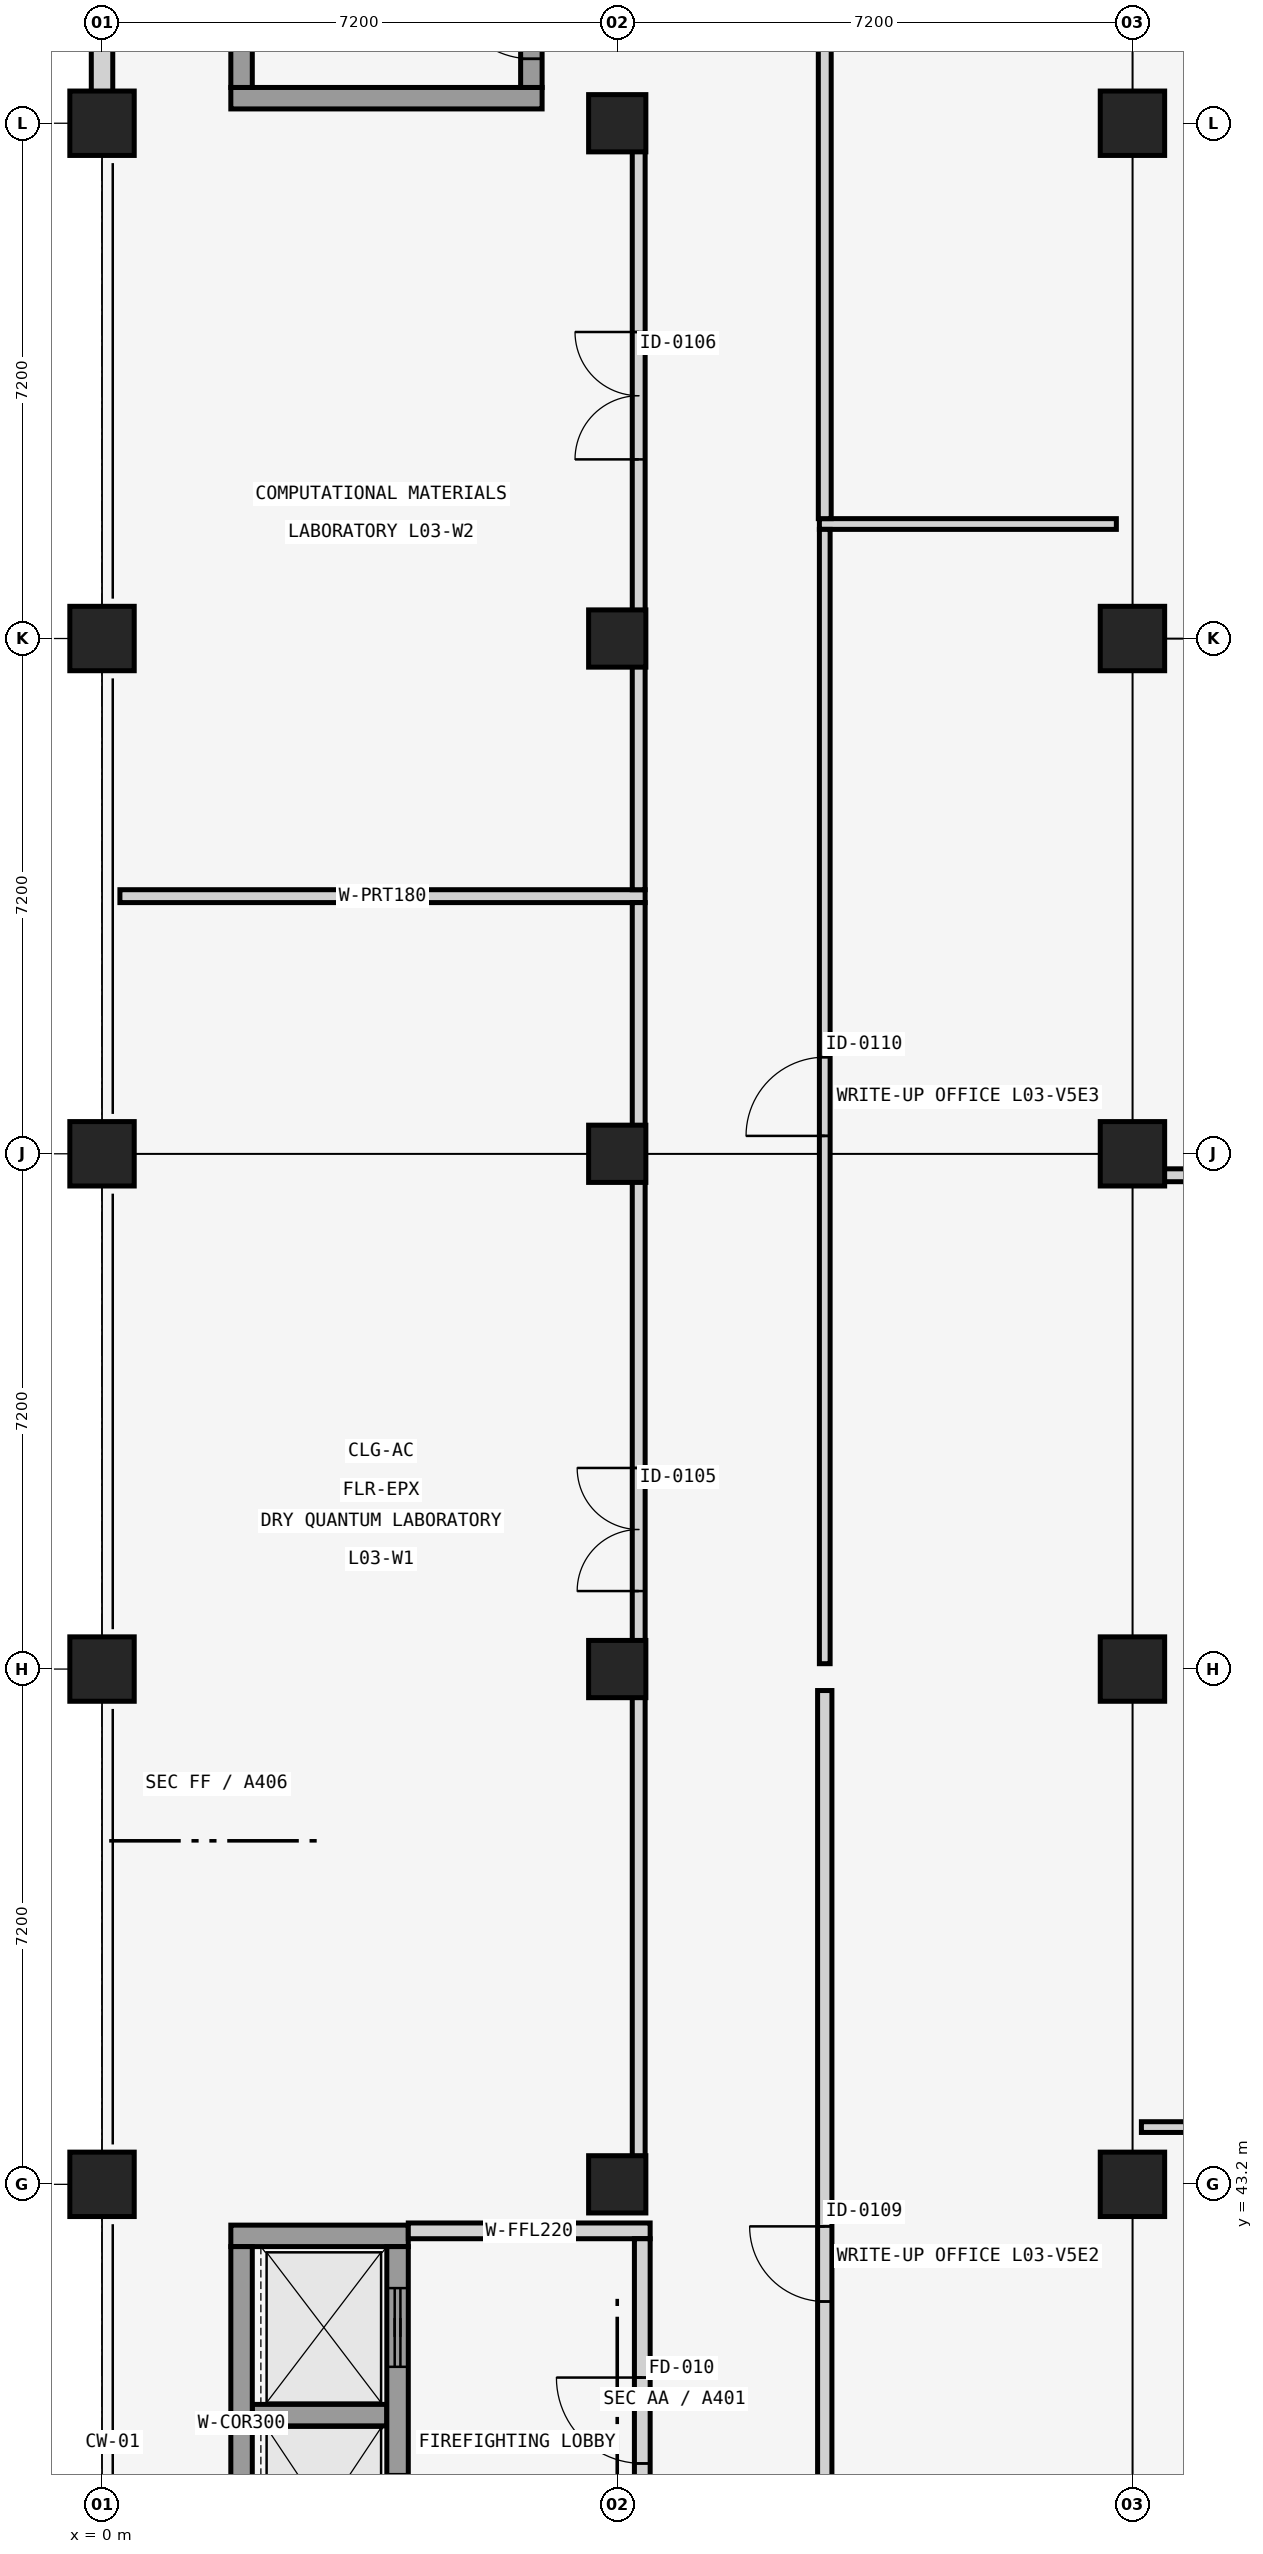
"""IFC4 building model, lengths in metres.
Left out: names, types, materials, properties, quantities, classifications, styles, units other than length and angle.
Written with IfcOpenShell. Run it as: python <this file> out.ifc"""

import sys

from ifc_helpers import new_model, si_unit, direction, frame, frame_2d, origin, origin_2d, place, context, subcontext, project, spatial, rectangle, extrude, element, fill, save


model = new_model("IFC4")
c1 = context("Model", 3, precision=1e-05, world=origin(), true_north=direction((0.0, 1.0)))
c2 = subcontext(c1, "Body", "Model", "MODEL_VIEW")
j1 = project(units=[si_unit("LENGTHUNIT", "METRE"), si_unit("PLANEANGLEUNIT", "RADIAN")], contexts=[c1])
p1 = place(None, origin())
s1 = spatial("IfcSite", under=j1, at=p1, CompositionType="ELEMENT")
p2 = place(p1, origin())
s2 = spatial("IfcBuilding", under=s1, at=p2, CompositionType="ELEMENT")
p3 = place(p2, frame((0.0, 0.0, 13.12)))
s3 = spatial("IfcBuildingStorey", under=s2, at=p3, CompositionType="ELEMENT", Elevation=13.12)
for number, where, z_axis, x_axis in (
    (1, (0.0, 43.2, 0.0), (0.0, 0.0, 1.0), (1.0, 0.0, 0.0)),
    (2, (0.0, 50.4, 0.0), (0.0, 0.0, 1.0), (1.0, 0.0, 0.0)),
    (3, (0.0, 57.6, 0.0), (0.0, 0.0, 1.0), (1.0, 0.0, 0.0)),
    (4, (0.0, 64.8, 0.0), (0.0, 0.0, 1.0), (1.0, 0.0, 0.0)),
    (5, (0.0, 72.0, 0.0), (0.0, 0.0, 1.0), (1.0, 0.0, 0.0)),
):
    element("IfcColumn", number, at=place(p3, frame(where, z_axis=z_axis, x_axis=x_axis)), inside=s3, PredefinedType="COLUMN", context=c2, shape_type="SweptSolid", body=[
        extrude(rectangle(XDim=0.9, YDim=0.9, at=origin_2d()), origin(), (0.0, 0.0, 1.0), 4.16),
    ])
for number, where, z_axis, x_axis in (
    (6, (7.2, 43.2, 0.0), (0.0, 0.0, 1.0), (1.0, 0.0, 0.0)),
    (7, (7.2, 50.4, 0.0), (0.0, 0.0, 1.0), (1.0, 0.0, 0.0)),
    (8, (7.2, 57.6, 0.0), (0.0, 0.0, 1.0), (1.0, 0.0, 0.0)),
    (9, (7.2, 64.8, 0.0), (0.0, 0.0, 1.0), (1.0, 0.0, 0.0)),
    (10, (7.2, 72.0, 0.0), (0.0, 0.0, 1.0), (1.0, 0.0, 0.0)),
):
    element("IfcColumn", number, at=place(p3, frame(where, z_axis=z_axis, x_axis=x_axis)), inside=s3, PredefinedType="COLUMN", context=c2, shape_type="SweptSolid", body=[
        extrude(rectangle(XDim=0.8, YDim=0.8, at=origin_2d()), origin(), (0.0, 0.0, 1.0), 4.16),
    ])
for number, where, z_axis, x_axis in (
    (11, (14.4, 43.2, 0.0), (0.0, 0.0, 1.0), (1.0, 0.0, 0.0)),
    (12, (14.4, 50.4, 0.0), (0.0, 0.0, 1.0), (1.0, 0.0, 0.0)),
    (13, (14.4, 57.6, 0.0), (0.0, 0.0, 1.0), (1.0, 0.0, 0.0)),
    (14, (14.4, 64.8, 0.0), (0.0, 0.0, 1.0), (1.0, 0.0, 0.0)),
    (15, (14.4, 72.0, 0.0), (0.0, 0.0, 1.0), (1.0, 0.0, 0.0)),
):
    element("IfcColumn", number, at=place(p3, frame(where, z_axis=z_axis, x_axis=x_axis)), inside=s3, PredefinedType="COLUMN", context=c2, shape_type="SweptSolid", body=[
        extrude(rectangle(XDim=0.9, YDim=0.9, at=origin_2d()), origin(), (0.0, 0.0, 1.0), 4.16),
    ])
p4 = place(p3, frame((0.0, 72.44, 0.0), z_axis=(0.0, 0.0, 1.0), x_axis=(0.0, 1.0, 0.0)))
e16 = element("IfcWall", 16, at=p4, inside=s3, PredefinedType="SOLIDWALL", context=c2, shape_type="SweptSolid", body=[
    extrude(rectangle(XDim=6.32, YDim=0.3, at=frame_2d((3.16, 0.0))), origin(), (0.0, 0.0, 1.0), 3.21),
])
p5 = place(p4, frame((2.935, 0.0, 0.65)))
e17 = element("IfcOpeningElement", 17, at=p5, cuts=e16, PredefinedType="OPENING", context=c2, shape_type="SweptSolid", body=[
    extrude(rectangle(XDim=0.45, YDim=2.4, at=frame_2d((0.225, 1.2))), frame((0.0, 0.16, 0.0), z_axis=(0.0, -1.0, 0.0), x_axis=(1.0, 0.0, 0.0)), (0.0, 0.0, 1.0), 0.32),
])
p6 = place(p3, frame((1.8, 42.48, 0.0), z_axis=(0.0, 0.0, 1.0), x_axis=(1.0, 0.0, 0.0)))
e18 = element("IfcWall", 18, at=p6, inside=s3, PredefinedType="SHEAR", context=c2, shape_type="SweptSolid", body=[
    extrude(rectangle(XDim=2.48, YDim=0.3, at=frame_2d((1.24, 0.0))), origin(), (0.0, 0.0, 1.0), 3.81),
])
p7 = place(p3, frame((2.1, 39.975, 0.0), z_axis=(0.0, 0.0, 1.0), x_axis=(1.0, 0.0, 0.0)))
e19 = element("IfcWall", 19, at=p7, inside=s3, PredefinedType="SHEAR", context=c2, shape_type="SweptSolid", body=[
    extrude(rectangle(XDim=1.88, YDim=0.3, at=frame_2d((0.94, 0.0))), origin(), (0.0, 0.0, 1.0), 3.81),
])
p8 = place(p3, frame((1.95, 37.4, 0.0), z_axis=(0.0, 0.0, 1.0), x_axis=(0.0, 1.0, 0.0)))
e20 = element("IfcWall", 20, at=p8, inside=s3, PredefinedType="SHEAR", context=c2, shape_type="SweptSolid", body=[
    extrude(rectangle(XDim=4.93, YDim=0.3, at=frame_2d((2.465, 0.0))), origin(), (0.0, 0.0, 1.0), 3.81),
])
p9 = place(p3, frame((4.13, 37.4, 0.0), z_axis=(0.0, 0.0, 1.0), x_axis=(0.0, 1.0, 0.0)))
e21 = element("IfcWall", 21, at=p9, inside=s3, PredefinedType="SHEAR", context=c2, shape_type="SweptSolid", body=[
    extrude(rectangle(XDim=4.93, YDim=0.3, at=frame_2d((2.465, 0.0))), origin(), (0.0, 0.0, 1.0), 3.81),
])
p10 = place(p9, frame((0.65, 0.0, 0.0)))
e22 = element("IfcOpeningElement", 22, at=p10, cuts=e21, PredefinedType="OPENING", context=c2, shape_type="SweptSolid", body=[
    extrude(rectangle(XDim=1.1, YDim=2.2, at=frame_2d((0.55, 1.1))), frame((0.0, 0.16, 0.0), z_axis=(0.0, -1.0, 0.0), x_axis=(1.0, 0.0, 0.0)), (0.0, 0.0, 1.0), 0.32),
])
p11 = place(p9, frame((3.25, 0.0, 0.0)))
e23 = element("IfcOpeningElement", 23, at=p11, cuts=e21, PredefinedType="OPENING", context=c2, shape_type="SweptSolid", body=[
    extrude(rectangle(XDim=1.1, YDim=2.2, at=frame_2d((0.55, 1.1))), frame((0.0, 0.16, 0.0), z_axis=(0.0, -1.0, 0.0), x_axis=(1.0, 0.0, 0.0)), (0.0, 0.0, 1.0), 0.32),
])
p12 = place(p3, frame((4.28, 42.55, 0.0), z_axis=(0.0, 0.0, 1.0), x_axis=(1.0, 0.0, 0.0)))
e24 = element("IfcWall", 24, at=p12, inside=s3, PredefinedType="SOLIDWALL", context=c2, shape_type="SweptSolid", body=[
    extrude(rectangle(XDim=3.38, YDim=0.22, at=frame_2d((1.69, 0.0))), origin(), (0.0, 0.0, 1.0), 2.81),
])
p13 = place(p3, frame((7.55, 37.36, 0.0), z_axis=(0.0, 0.0, 1.0), x_axis=(0.0, 1.0, 0.0)))
e25 = element("IfcWall", 25, at=p13, inside=s3, PredefinedType="SOLIDWALL", context=c2, shape_type="SweptSolid", body=[
    extrude(rectangle(XDim=5.08, YDim=0.22, at=frame_2d((2.54, 0.0))), origin(), (0.0, 0.0, 1.0), 3.51),
])
p14 = place(p13, frame((1.94, 0.0, 0.0)))
e26 = element("IfcOpeningElement", 26, at=p14, cuts=e25, PredefinedType="OPENING", context=c2, shape_type="SweptSolid", body=[
    extrude(rectangle(XDim=1.2, YDim=2.2, at=frame_2d((0.6, 1.1))), frame((0.0, 0.12, 0.0), z_axis=(0.0, -1.0, 0.0), x_axis=(1.0, 0.0, 0.0)), (0.0, 0.0, 1.0), 0.24),
])
p15 = place(p3, frame((1.8, 72.35, 0.0), z_axis=(0.0, 0.0, 1.0), x_axis=(1.0, 0.0, 0.0)))
e27 = element("IfcWall", 27, at=p15, inside=s3, PredefinedType="SHEAR", context=c2, shape_type="SweptSolid", body=[
    extrude(rectangle(XDim=4.35, YDim=0.3, at=frame_2d((2.175, 0.0))), origin(), (0.0, 0.0, 1.0), 3.81),
])
p16 = place(p3, frame((1.95, 72.5, 0.0), z_axis=(0.0, 0.0, 1.0), x_axis=(0.0, 1.0, 0.0)))
e28 = element("IfcWall", 28, at=p16, inside=s3, PredefinedType="SHEAR", context=c2, shape_type="SweptSolid", body=[
    extrude(rectangle(XDim=7.8, YDim=0.3, at=frame_2d((3.9, 0.0))), origin(), (0.0, 0.0, 1.0), 3.81),
])
p17 = place(p3, frame((6.0, 72.5, 0.0), z_axis=(0.0, 0.0, 1.0), x_axis=(0.0, 1.0, 0.0)))
e29 = element("IfcWall", 29, at=p17, inside=s3, PredefinedType="SHEAR", context=c2, shape_type="SweptSolid", body=[
    extrude(rectangle(XDim=7.8, YDim=0.3, at=frame_2d((3.9, 0.0))), origin(), (0.0, 0.0, 1.0), 3.81),
])
p18 = place(p17, frame((0.4, 0.0, 0.0)))
e30 = element("IfcOpeningElement", 30, at=p18, cuts=e29, PredefinedType="OPENING", context=c2, shape_type="SweptSolid", body=[
    extrude(rectangle(XDim=1.15, YDim=2.2, at=frame_2d((0.575, 1.1))), frame((0.0, 0.16, 0.0), z_axis=(0.0, -1.0, 0.0), x_axis=(1.0, 0.0, 0.0)), (0.0, 0.0, 1.0), 0.32),
])
p19 = place(p3, frame((0.25, 61.2, 0.0), z_axis=(0.0, 0.0, 1.0), x_axis=(1.0, 0.0, 0.0)))
e31 = element("IfcWall", 31, at=p19, inside=s3, PredefinedType="PARTITIONING", context=c2, shape_type="SweptSolid", body=[
    extrude(rectangle(XDim=7.34, YDim=0.18, at=frame_2d((3.67, 0.0))), origin(), (0.0, 0.0, 1.0), 3.21),
])
p20 = place(p3, frame((7.5, 43.59, 0.0), z_axis=(0.0, 0.0, 1.0), x_axis=(0.0, 1.0, 0.0)))
e32 = element("IfcWall", 32, at=p20, inside=s3, PredefinedType="PARTITIONING", context=c2, shape_type="SweptSolid", body=[
    extrude(rectangle(XDim=17.52, YDim=0.18, at=frame_2d((8.76, 0.0))), origin(), (0.0, 0.0, 1.0), 3.21),
])
p21 = place(p20, frame((7.9, 0.0, 0.0)))
e33 = element("IfcOpeningElement", 33, at=p21, cuts=e32, PredefinedType="OPENING", context=c2, shape_type="SweptSolid", body=[
    extrude(rectangle(XDim=1.72, YDim=2.26, at=frame_2d((0.86, 1.13))), frame((0.0, 0.1, 0.0), z_axis=(0.0, -1.0, 0.0), x_axis=(1.0, 0.0, 0.0)), (0.0, 0.0, 1.0), 0.2),
])
p22 = place(p3, frame((7.5, 61.29, 0.0), z_axis=(0.0, 0.0, 1.0), x_axis=(0.0, 1.0, 0.0)))
e34 = element("IfcWall", 34, at=p22, inside=s3, PredefinedType="PARTITIONING", context=c2, shape_type="SweptSolid", body=[
    extrude(rectangle(XDim=10.62, YDim=0.18, at=frame_2d((5.31, 0.0))), origin(), (0.0, 0.0, 1.0), 3.21),
])
p23 = place(p22, frame((6.013, 0.0, 0.0)))
e35 = element("IfcOpeningElement", 35, at=p23, cuts=e34, PredefinedType="OPENING", context=c2, shape_type="SweptSolid", body=[
    extrude(rectangle(XDim=1.78, YDim=2.26, at=frame_2d((0.89, 1.13))), frame((0.0, 0.1, 0.0), z_axis=(0.0, -1.0, 0.0), x_axis=(1.0, 0.0, 0.0)), (0.0, 0.0, 1.0), 0.2),
])
p24 = place(p3, frame((10.1, 34.075, 0.0), z_axis=(0.0, 0.0, 1.0), x_axis=(0.0, 1.0, 0.0)))
e36 = element("IfcWall", 36, at=p24, inside=s3, PredefinedType="PARTITIONING", context=c2, shape_type="SweptSolid", body=[
    extrude(rectangle(XDim=16.025, YDim=0.2, at=frame_2d((8.013, 0.0))), origin(), (0.0, 0.0, 1.0), 3.21),
])
p25 = place(p24, frame((7.488, 0.0, 0.0)))
e37 = element("IfcOpeningElement", 37, at=p25, cuts=e36, PredefinedType="OPENING", context=c2, shape_type="SweptSolid", body=[
    extrude(rectangle(XDim=1.05, YDim=2.15, at=frame_2d((0.525, 1.075))), frame((0.0, 0.11, 0.0), z_axis=(0.0, -1.0, 0.0), x_axis=(1.0, 0.0, 0.0)), (0.0, 0.0, 1.0), 0.22),
])
p26 = place(p3, frame((10.025, 66.4, 0.0), z_axis=(0.0, 0.0, 1.0), x_axis=(1.0, 0.0, 0.0)))
e38 = element("IfcWall", 38, at=p26, inside=s3, PredefinedType="PARTITIONING", context=c2, shape_type="SweptSolid", body=[
    extrude(rectangle(XDim=4.15, YDim=0.15, at=frame_2d((2.075, 0.0))), origin(), (0.0, 0.0, 1.0), 3.26),
])
p27 = place(p3, frame((10.1, 50.475, 0.0), z_axis=(0.0, 0.0, 1.0), x_axis=(0.0, 1.0, 0.0)))
e39 = element("IfcWall", 39, at=p27, inside=s3, PredefinedType="PARTITIONING", context=c2, shape_type="SweptSolid", body=[
    extrude(rectangle(XDim=15.85, YDim=0.15, at=frame_2d((7.925, 0.0))), origin(), (0.0, 0.0, 1.0), 3.21),
])
p28 = place(p27, frame((7.375, 0.0, 0.0)))
e40 = element("IfcOpeningElement", 40, at=p28, cuts=e39, PredefinedType="OPENING", context=c2, shape_type="SweptSolid", body=[
    extrude(rectangle(XDim=1.1, YDim=2.15, at=frame_2d((0.55, 1.075))), frame((0.0, 0.085, 0.0), z_axis=(0.0, -1.0, 0.0), x_axis=(1.0, 0.0, 0.0)), (0.0, 0.0, 1.0), 0.17),
])
p29 = place(p3, frame((10.1, 66.475, 0.0), z_axis=(0.0, 0.0, 1.0), x_axis=(0.0, 1.0, 0.0)))
e41 = element("IfcWall", 41, at=p29, inside=s3, PredefinedType="PARTITIONING", context=c2, shape_type="SweptSolid", body=[
    extrude(rectangle(XDim=19.525, YDim=0.18, at=frame_2d((9.762, 0.0))), origin(), (0.0, 0.0, 1.0), 3.21),
])
p30 = place(p29, frame((9.137, 0.0, 0.0)))
e42 = element("IfcOpeningElement", 42, at=p30, cuts=e41, PredefinedType="OPENING", context=c2, shape_type="SweptSolid", body=[
    extrude(rectangle(XDim=1.25, YDim=2.2, at=frame_2d((0.625, 1.1))), frame((0.0, 0.1, 0.0), z_axis=(0.0, -1.0, 0.0), x_axis=(1.0, 0.0, 0.0)), (0.0, 0.0, 1.0), 0.2),
])
p31 = place(p3, frame((14.525, 44.0, 0.0), z_axis=(0.0, 0.0, 1.0), x_axis=(1.0, 0.0, 0.0)))
e43 = element("IfcWall", 43, at=p31, inside=s3, PredefinedType="PARTITIONING", context=c2, shape_type="SweptSolid", body=[
    extrude(rectangle(XDim=21.55, YDim=0.15, at=frame_2d((10.775, 0.0))), origin(), (0.0, 0.0, 1.0), 2.81),
])
p32 = place(p3, frame((14.51, 57.3, 0.0), z_axis=(0.0, 0.0, 1.0), x_axis=(1.0, 0.0, 0.0)))
e44 = element("IfcWall", 44, at=p32, inside=s3, PredefinedType="PARTITIONING", context=c2, shape_type="SweptSolid", body=[
    extrude(rectangle(XDim=21.58, YDim=0.18, at=frame_2d((10.79, 0.0))), origin(), (0.0, 0.0, 1.0), 2.81),
])
p33 = place(p32, frame((10.04, 0.0, 0.0)))
e45 = element("IfcOpeningElement", 45, at=p33, cuts=e44, PredefinedType="OPENING", context=c2, shape_type="SweptSolid", body=[
    extrude(rectangle(XDim=1.5, YDim=2.2, at=frame_2d((0.75, 1.1))), frame((0.0, 0.1, 0.0), z_axis=(0.0, -1.0, 0.0), x_axis=(1.0, 0.0, 0.0)), (0.0, 0.0, 1.0), 0.2),
])
p34 = place(p11, origin())
e46 = element("IfcDoor", 46, at=p34, inside=s3, OperationType="SLIDING_TO_LEFT", PredefinedType="DOOR", context=c2, shape_type="SweptSolid", body=[
    extrude(rectangle(XDim=1.1, YDim=2.2, at=frame_2d((0.55, 1.1))), frame((0.0, 0.025, 0.0), z_axis=(0.0, -1.0, 0.0), x_axis=(1.0, 0.0, 0.0)), (0.0, 0.0, 1.0), 0.05),
])
fill(e23, e46)
p35 = place(p14, origin())
e47 = element("IfcDoor", 47, at=p35, inside=s3, OperationType="SINGLE_SWING_RIGHT", PredefinedType="DOOR", context=c2, shape_type="SweptSolid", body=[
    extrude(rectangle(XDim=1.2, YDim=2.2, at=frame_2d((0.6, 1.1))), frame((0.0, 0.025, 0.0), z_axis=(0.0, -1.0, 0.0), x_axis=(1.0, 0.0, 0.0)), (0.0, 0.0, 1.0), 0.05),
])
fill(e26, e47)
p36 = place(p18, origin())
e48 = element("IfcDoor", 48, at=p36, inside=s3, OperationType="SINGLE_SWING_RIGHT", PredefinedType="DOOR", context=c2, shape_type="SweptSolid", body=[
    extrude(rectangle(XDim=1.15, YDim=2.2, at=frame_2d((0.575, 1.1))), frame((0.0, 0.025, 0.0), z_axis=(0.0, -1.0, 0.0), x_axis=(1.0, 0.0, 0.0)), (0.0, 0.0, 1.0), 0.05),
])
fill(e30, e48)
p37 = place(p21, origin())
e49 = element("IfcDoor", 49, at=p37, inside=s3, OperationType="DOUBLE_DOOR_SINGLE_SWING", PredefinedType="DOOR", context=c2, shape_type="SweptSolid", body=[
    extrude(rectangle(XDim=1.72, YDim=2.26, at=frame_2d((0.86, 1.13))), frame((0.0, 0.025, 0.0), z_axis=(0.0, -1.0, 0.0), x_axis=(1.0, 0.0, 0.0)), (0.0, 0.0, 1.0), 0.05),
])
fill(e33, e49)
p38 = place(p23, origin())
e50 = element("IfcDoor", 50, at=p38, inside=s3, OperationType="DOUBLE_DOOR_SINGLE_SWING", PredefinedType="DOOR", context=c2, shape_type="SweptSolid", body=[
    extrude(rectangle(XDim=1.78, YDim=2.26, at=frame_2d((0.89, 1.13))), frame((0.0, 0.025, 0.0), z_axis=(0.0, -1.0, 0.0), x_axis=(1.0, 0.0, 0.0)), (0.0, 0.0, 1.0), 0.05),
])
fill(e35, e50)
p39 = place(p25, origin())
e51 = element("IfcDoor", 51, at=p39, inside=s3, OperationType="SINGLE_SWING_RIGHT", PredefinedType="DOOR", context=c2, shape_type="SweptSolid", body=[
    extrude(rectangle(XDim=1.05, YDim=2.15, at=frame_2d((0.525, 1.075))), frame((0.0, 0.025, 0.0), z_axis=(0.0, -1.0, 0.0), x_axis=(1.0, 0.0, 0.0)), (0.0, 0.0, 1.0), 0.05),
])
fill(e37, e51)
p40 = place(p28, origin())
e52 = element("IfcDoor", 52, at=p40, inside=s3, OperationType="SINGLE_SWING_LEFT", PredefinedType="DOOR", context=c2, shape_type="SweptSolid", body=[
    extrude(rectangle(XDim=1.1, YDim=2.15, at=frame_2d((0.55, 1.075))), frame((0.0, 0.025, 0.0), z_axis=(0.0, -1.0, 0.0), x_axis=(1.0, 0.0, 0.0)), (0.0, 0.0, 1.0), 0.05),
])
fill(e40, e52)
save(model, sys.argv[1])
